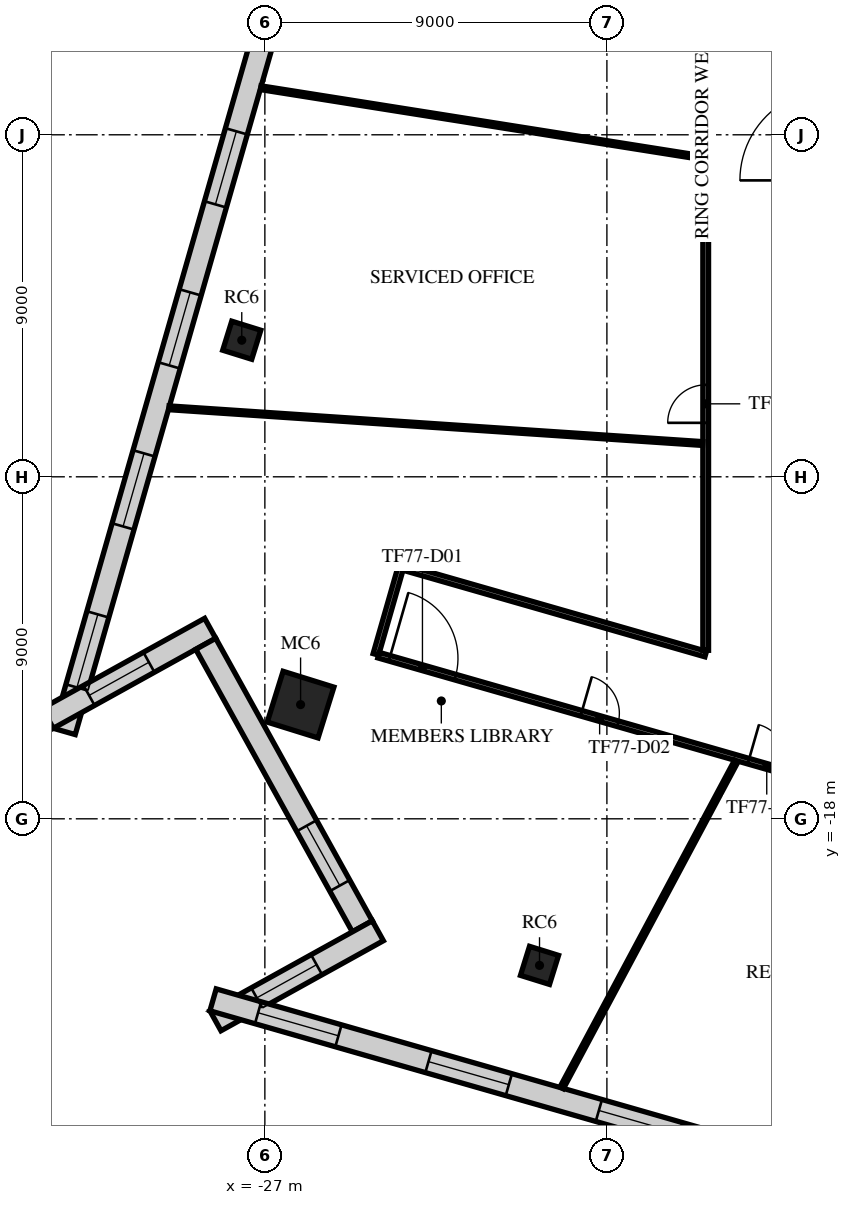
"""IFC4 building model, lengths in metres.
Left out: names, types, materials, properties, quantities, classifications, styles, units other than length and angle.
Written with IfcOpenShell. Run it as: python <this file> out.ifc"""

import sys

from ifc_helpers import new_model, si_unit, direction, frame, frame_2d, origin, origin_2d, place, context, subcontext, project, spatial, rectangle, extrude, element, fill, save


model = new_model("IFC4")
c1 = context("Model", 3, precision=1e-05, world=origin(), true_north=direction((0.0, 1.0)))
c2 = subcontext(c1, "Body", "Model", "MODEL_VIEW")
j1 = project(units=[si_unit("LENGTHUNIT", "METRE"), si_unit("PLANEANGLEUNIT", "RADIAN")], contexts=[c1])
p1 = place(None, origin())
s1 = spatial("IfcSite", under=j1, at=p1, CompositionType="ELEMENT")
p2 = place(p1, origin())
s2 = spatial("IfcBuilding", under=s1, at=p2, CompositionType="ELEMENT")
p3 = place(p2, frame((0.0, 0.0, 324.5)))
s3 = spatial("IfcBuildingStorey", under=s2, at=p3, CompositionType="ELEMENT", Elevation=324.5)
p4 = place(p3, frame((-27.608, -5.406, 0.0), z_axis=(0.0, 0.0, 1.0), x_axis=(0.297503182032, 0.954720826567, 0.0)))
e1 = element("IfcColumn", 1, at=p4, inside=s3, PredefinedType="COLUMN", context=c2, shape_type="SweptSolid", body=[
    extrude(rectangle(XDim=0.8, YDim=0.8, at=origin_2d()), origin(), (0.0, 0.0, 1.0), 4.0),
])
p5 = place(p3, frame((-26.06, -14.995, 0.0), z_axis=(0.0, 0.0, 1.0), x_axis=(0.297503182032, 0.954720826567, 0.0)))
e2 = element("IfcColumn", 2, at=p5, inside=s3, PredefinedType="COLUMN", context=c2, shape_type="SweptSolid", body=[
    extrude(rectangle(XDim=1.4, YDim=1.4, at=origin_2d()), origin(), (0.0, 0.0, 1.0), 4.0),
])
p6 = place(p3, frame((-19.773, -21.857, 0.0), z_axis=(0.0, 0.0, 1.0), x_axis=(0.297503182032, 0.954720826567, 0.0)))
e3 = element("IfcColumn", 3, at=p6, inside=s3, PredefinedType="COLUMN", context=c2, shape_type="SweptSolid", body=[
    extrude(rectangle(XDim=0.8, YDim=0.8, at=origin_2d()), origin(), (0.0, 0.0, 1.0), 4.0),
])
p7 = place(p3, frame((-18.913, 30.91, 0.0), z_axis=(0.0, 0.0, 1.0), x_axis=(-0.275636693765, -0.961261885778, 0.0)))
e4 = element("IfcWall", 4, at=p7, inside=s3, PredefinedType="STANDARD", context=c2, shape_type="SweptSolid", body=[
    extrude(rectangle(XDim=48.49, YDim=0.6, at=frame_2d((24.245, 0.0))), origin(), (0.0, 0.0, 1.0), 3.65),
])
p8 = place(p7, frame((1.204, 0.0, 0.9)))
e5 = element("IfcOpeningElement", 5, at=p8, cuts=e4, PredefinedType="OPENING", context=c2, shape_type="SweptSolid", body=[
    extrude(rectangle(XDim=2.0, YDim=2.1, at=frame_2d((1.0, 1.05))), frame((0.0, 0.31, 0.0), z_axis=(0.0, -1.0, 0.0), x_axis=(1.0, 0.0, 0.0)), (0.0, 0.0, 1.0), 0.62),
])
p9 = place(p7, frame((5.612, 0.0, 0.9)))
e6 = element("IfcOpeningElement", 6, at=p9, cuts=e4, PredefinedType="OPENING", context=c2, shape_type="SweptSolid", body=[
    extrude(rectangle(XDim=2.0, YDim=2.1, at=frame_2d((1.0, 1.05))), frame((0.0, 0.31, 0.0), z_axis=(0.0, -1.0, 0.0), x_axis=(1.0, 0.0, 0.0)), (0.0, 0.0, 1.0), 0.62),
])
p10 = place(p7, frame((10.021, 0.0, 0.9)))
e7 = element("IfcOpeningElement", 7, at=p10, cuts=e4, PredefinedType="OPENING", context=c2, shape_type="SweptSolid", body=[
    extrude(rectangle(XDim=2.0, YDim=2.1, at=frame_2d((1.0, 1.05))), frame((0.0, 0.31, 0.0), z_axis=(0.0, -1.0, 0.0), x_axis=(1.0, 0.0, 0.0)), (0.0, 0.0, 1.0), 0.62),
])
p11 = place(p7, frame((14.428, 0.0, 0.9)))
e8 = element("IfcOpeningElement", 8, at=p11, cuts=e4, PredefinedType="OPENING", context=c2, shape_type="SweptSolid", body=[
    extrude(rectangle(XDim=2.0, YDim=2.1, at=frame_2d((1.0, 1.05))), frame((0.0, 0.31, 0.0), z_axis=(0.0, -1.0, 0.0), x_axis=(1.0, 0.0, 0.0)), (0.0, 0.0, 1.0), 0.62),
])
p12 = place(p7, frame((18.837, 0.0, 0.9)))
e9 = element("IfcOpeningElement", 9, at=p12, cuts=e4, PredefinedType="OPENING", context=c2, shape_type="SweptSolid", body=[
    extrude(rectangle(XDim=2.0, YDim=2.1, at=frame_2d((1.0, 1.05))), frame((0.0, 0.31, 0.0), z_axis=(0.0, -1.0, 0.0), x_axis=(1.0, 0.0, 0.0)), (0.0, 0.0, 1.0), 0.62),
])
p13 = place(p7, frame((23.245, 0.0, 0.9)))
e10 = element("IfcOpeningElement", 10, at=p13, cuts=e4, PredefinedType="OPENING", context=c2, shape_type="SweptSolid", body=[
    extrude(rectangle(XDim=2.0, YDim=2.1, at=frame_2d((1.0, 1.05))), frame((0.0, 0.31, 0.0), z_axis=(0.0, -1.0, 0.0), x_axis=(1.0, 0.0, 0.0)), (0.0, 0.0, 1.0), 0.62),
])
p14 = place(p7, frame((27.653, 0.0, 0.9)))
e11 = element("IfcOpeningElement", 11, at=p14, cuts=e4, PredefinedType="OPENING", context=c2, shape_type="SweptSolid", body=[
    extrude(rectangle(XDim=2.0, YDim=2.1, at=frame_2d((1.0, 1.05))), frame((0.0, 0.31, 0.0), z_axis=(0.0, -1.0, 0.0), x_axis=(1.0, 0.0, 0.0)), (0.0, 0.0, 1.0), 0.62),
])
p15 = place(p7, frame((32.061, 0.0, 0.9)))
e12 = element("IfcOpeningElement", 12, at=p15, cuts=e4, PredefinedType="OPENING", context=c2, shape_type="SweptSolid", body=[
    extrude(rectangle(XDim=2.0, YDim=2.1, at=frame_2d((1.0, 1.05))), frame((0.0, 0.31, 0.0), z_axis=(0.0, -1.0, 0.0), x_axis=(1.0, 0.0, 0.0)), (0.0, 0.0, 1.0), 0.62),
])
p16 = place(p7, frame((36.469, 0.0, 0.9)))
e13 = element("IfcOpeningElement", 13, at=p16, cuts=e4, PredefinedType="OPENING", context=c2, shape_type="SweptSolid", body=[
    extrude(rectangle(XDim=2.0, YDim=2.1, at=frame_2d((1.0, 1.05))), frame((0.0, 0.31, 0.0), z_axis=(0.0, -1.0, 0.0), x_axis=(1.0, 0.0, 0.0)), (0.0, 0.0, 1.0), 0.62),
])
p17 = place(p7, frame((40.877, 0.0, 0.9)))
e14 = element("IfcOpeningElement", 14, at=p17, cuts=e4, PredefinedType="OPENING", context=c2, shape_type="SweptSolid", body=[
    extrude(rectangle(XDim=2.0, YDim=2.1, at=frame_2d((1.0, 1.05))), frame((0.0, 0.31, 0.0), z_axis=(0.0, -1.0, 0.0), x_axis=(1.0, 0.0, 0.0)), (0.0, 0.0, 1.0), 0.62),
])
p18 = place(p7, frame((45.285, 0.0, 0.9)))
e15 = element("IfcOpeningElement", 15, at=p18, cuts=e4, PredefinedType="OPENING", context=c2, shape_type="SweptSolid", body=[
    extrude(rectangle(XDim=2.0, YDim=2.1, at=frame_2d((1.0, 1.05))), frame((0.0, 0.31, 0.0), z_axis=(0.0, -1.0, 0.0), x_axis=(1.0, 0.0, 0.0)), (0.0, 0.0, 1.0), 0.62),
])
p19 = place(p3, frame((-32.712, -15.356, 0.0), z_axis=(0.0, 0.0, 1.0), x_axis=(0.874609472896, 0.48482808285, 0.0)))
e16 = element("IfcWall", 16, at=p19, inside=s3, PredefinedType="STANDARD", context=c2, shape_type="SweptSolid", body=[
    extrude(rectangle(XDim=4.885, YDim=0.6, at=frame_2d((2.443, 0.0))), origin(), (0.0, 0.0, 1.0), 3.65),
])
p20 = place(p19, frame((1.243, 0.0, 0.9)))
e17 = element("IfcOpeningElement", 17, at=p20, cuts=e16, PredefinedType="OPENING", context=c2, shape_type="SweptSolid", body=[
    extrude(rectangle(XDim=1.8, YDim=2.1, at=frame_2d((0.9, 1.05))), frame((0.0, 0.31, 0.0), z_axis=(0.0, -1.0, 0.0), x_axis=(1.0, 0.0, 0.0)), (0.0, 0.0, 1.0), 0.62),
])
p21 = place(p3, frame((-28.556, -13.395, 0.0), z_axis=(0.0, 0.0, 1.0), x_axis=(0.48481597855, -0.874616182644, 0.0)))
e18 = element("IfcWall", 18, at=p21, inside=s3, PredefinedType="STANDARD", context=c2, shape_type="SweptSolid", body=[
    extrude(rectangle(XDim=8.5, YDim=0.6, at=frame_2d((4.25, 0.0))), origin(), (0.0, 0.0, 1.0), 3.65),
])
p22 = place(p21, frame((5.475, 0.0, 0.9)))
e19 = element("IfcOpeningElement", 19, at=p22, cuts=e18, PredefinedType="OPENING", context=c2, shape_type="SweptSolid", body=[
    extrude(rectangle(XDim=1.8, YDim=2.1, at=frame_2d((0.9, 1.05))), frame((0.0, 0.31, 0.0), z_axis=(0.0, -1.0, 0.0), x_axis=(1.0, 0.0, 0.0)), (0.0, 0.0, 1.0), 0.62),
])
p23 = place(p3, frame((-24.027, -20.946, 0.0), z_axis=(0.0, 0.0, 1.0), x_axis=(-0.874642406439, -0.484768667364, 0.0)))
e20 = element("IfcWall", 20, at=p23, inside=s3, PredefinedType="STANDARD", context=c2, shape_type="SweptSolid", body=[
    extrude(rectangle(XDim=4.886, YDim=0.6, at=frame_2d((2.443, 0.0))), origin(), (0.0, 0.0, 1.0), 3.65),
])
p24 = place(p23, frame((1.843, 0.0, 0.9)))
e21 = element("IfcOpeningElement", 21, at=p24, cuts=e20, PredefinedType="OPENING", context=c2, shape_type="SweptSolid", body=[
    extrude(rectangle(XDim=1.8, YDim=2.1, at=frame_2d((0.9, 1.05))), frame((0.0, 0.31, 0.0), z_axis=(0.0, -1.0, 0.0), x_axis=(1.0, 0.0, 0.0)), (0.0, 0.0, 1.0), 0.62),
])
p25 = place(p3, frame((-28.363, -22.764, 0.0), z_axis=(0.0, 0.0, 1.0), x_axis=(0.961261250735, -0.275638908422, 0.0)))
e22 = element("IfcWall", 22, at=p25, inside=s3, PredefinedType="STANDARD", context=c2, shape_type="SweptSolid", body=[
    extrude(rectangle(XDim=41.979, YDim=0.6, at=frame_2d((20.99, 0.0))), origin(), (0.0, 0.0, 1.0), 3.65),
])
p26 = place(p25, frame((1.232, 0.0, 0.9)))
e23 = element("IfcOpeningElement", 23, at=p26, cuts=e22, PredefinedType="OPENING", context=c2, shape_type="SweptSolid", body=[
    extrude(rectangle(XDim=2.2, YDim=2.1, at=frame_2d((1.1, 1.05))), frame((0.0, 0.31, 0.0), z_axis=(0.0, -1.0, 0.0), x_axis=(1.0, 0.0, 0.0)), (0.0, 0.0, 1.0), 0.62),
])
p27 = place(p25, frame((5.896, 0.0, 0.9)))
e24 = element("IfcOpeningElement", 24, at=p27, cuts=e22, PredefinedType="OPENING", context=c2, shape_type="SweptSolid", body=[
    extrude(rectangle(XDim=2.2, YDim=2.1, at=frame_2d((1.1, 1.05))), frame((0.0, 0.31, 0.0), z_axis=(0.0, -1.0, 0.0), x_axis=(1.0, 0.0, 0.0)), (0.0, 0.0, 1.0), 0.62),
])
p28 = place(p25, frame((10.561, 0.0, 0.9)))
e25 = element("IfcOpeningElement", 25, at=p28, cuts=e22, PredefinedType="OPENING", context=c2, shape_type="SweptSolid", body=[
    extrude(rectangle(XDim=2.2, YDim=2.1, at=frame_2d((1.1, 1.05))), frame((0.0, 0.31, 0.0), z_axis=(0.0, -1.0, 0.0), x_axis=(1.0, 0.0, 0.0)), (0.0, 0.0, 1.0), 0.62),
])
p29 = place(p25, frame((15.225, 0.0, 0.9)))
e26 = element("IfcOpeningElement", 26, at=p29, cuts=e22, PredefinedType="OPENING", context=c2, shape_type="SweptSolid", body=[
    extrude(rectangle(XDim=2.2, YDim=2.1, at=frame_2d((1.1, 1.05))), frame((0.0, 0.31, 0.0), z_axis=(0.0, -1.0, 0.0), x_axis=(1.0, 0.0, 0.0)), (0.0, 0.0, 1.0), 0.62),
])
p30 = place(p25, frame((19.89, 0.0, 0.9)))
e27 = element("IfcOpeningElement", 27, at=p30, cuts=e22, PredefinedType="OPENING", context=c2, shape_type="SweptSolid", body=[
    extrude(rectangle(XDim=2.2, YDim=2.1, at=frame_2d((1.1, 1.05))), frame((0.0, 0.31, 0.0), z_axis=(0.0, -1.0, 0.0), x_axis=(1.0, 0.0, 0.0)), (0.0, 0.0, 1.0), 0.62),
])
p31 = place(p25, frame((24.554, 0.0, 0.9)))
e28 = element("IfcOpeningElement", 28, at=p31, cuts=e22, PredefinedType="OPENING", context=c2, shape_type="SweptSolid", body=[
    extrude(rectangle(XDim=2.2, YDim=2.1, at=frame_2d((1.1, 1.05))), frame((0.0, 0.31, 0.0), z_axis=(0.0, -1.0, 0.0), x_axis=(1.0, 0.0, 0.0)), (0.0, 0.0, 1.0), 0.62),
])
p32 = place(p25, frame((29.218, 0.0, 0.9)))
e29 = element("IfcOpeningElement", 29, at=p32, cuts=e22, PredefinedType="OPENING", context=c2, shape_type="SweptSolid", body=[
    extrude(rectangle(XDim=2.2, YDim=2.1, at=frame_2d((1.1, 1.05))), frame((0.0, 0.31, 0.0), z_axis=(0.0, -1.0, 0.0), x_axis=(1.0, 0.0, 0.0)), (0.0, 0.0, 1.0), 0.62),
])
p33 = place(p25, frame((33.883, 0.0, 0.9)))
e30 = element("IfcOpeningElement", 30, at=p33, cuts=e22, PredefinedType="OPENING", context=c2, shape_type="SweptSolid", body=[
    extrude(rectangle(XDim=2.2, YDim=2.1, at=frame_2d((1.1, 1.05))), frame((0.0, 0.31, 0.0), z_axis=(0.0, -1.0, 0.0), x_axis=(1.0, 0.0, 0.0)), (0.0, 0.0, 1.0), 0.62),
])
p34 = place(p25, frame((38.547, 0.0, 0.9)))
e31 = element("IfcOpeningElement", 31, at=p34, cuts=e22, PredefinedType="OPENING", context=c2, shape_type="SweptSolid", body=[
    extrude(rectangle(XDim=2.2, YDim=2.1, at=frame_2d((1.1, 1.05))), frame((0.0, 0.31, 0.0), z_axis=(0.0, -1.0, 0.0), x_axis=(1.0, 0.0, 0.0)), (0.0, 0.0, 1.0), 0.62),
])
p35 = place(p3, frame((-24.079, -13.673, 0.0), z_axis=(0.0, 0.0, 1.0), x_axis=(0.275849392554, 0.961200870072, 0.0)))
e32 = element("IfcWall", 32, at=p35, inside=s3, PredefinedType="PARTITIONING", context=c2, shape_type="SweptSolid", body=[
    extrude(rectangle(XDim=2.4, YDim=0.15, at=frame_2d((1.2, 0.0))), origin(), (0.0, 0.0, 1.0), 3.65),
])
p36 = place(p3, frame((-24.007, -13.694, 0.0), z_axis=(0.0, 0.0, 1.0), x_axis=(0.961264140923, -0.275628828998, 0.0)))
e33 = element("IfcWall", 33, at=p36, inside=s3, PredefinedType="PARTITIONING", context=c2, shape_type="SweptSolid", body=[
    extrude(rectangle(XDim=38.68, YDim=0.15, at=frame_2d((19.34, 0.0))), origin(), (0.0, 0.0, 1.0), 3.25),
])
p37 = place(p36, frame((0.3, 0.0, 0.0)))
e34 = element("IfcOpeningElement", 34, at=p37, cuts=e33, PredefinedType="OPENING", context=c2, shape_type="SweptSolid", body=[
    extrude(rectangle(XDim=1.8, YDim=2.1, at=frame_2d((0.9, 1.05))), frame((0.0, 0.085, 0.0), z_axis=(0.0, -1.0, 0.0), x_axis=(1.0, 0.0, 0.0)), (0.0, 0.0, 1.0), 0.17),
])
p38 = place(p36, frame((5.55, 0.0, 0.0)))
e35 = element("IfcOpeningElement", 35, at=p38, cuts=e33, PredefinedType="OPENING", context=c2, shape_type="SweptSolid", body=[
    extrude(rectangle(XDim=1.0, YDim=2.1, at=frame_2d((0.5, 1.05))), frame((0.0, 0.085, 0.0), z_axis=(0.0, -1.0, 0.0), x_axis=(1.0, 0.0, 0.0)), (0.0, 0.0, 1.0), 0.17),
])
p39 = place(p36, frame((10.125, 0.0, 0.0)))
e36 = element("IfcOpeningElement", 36, at=p39, cuts=e33, PredefinedType="OPENING", context=c2, shape_type="SweptSolid", body=[
    extrude(rectangle(XDim=1.0, YDim=2.1, at=frame_2d((0.5, 1.05))), frame((0.0, 0.085, 0.0), z_axis=(0.0, -1.0, 0.0), x_axis=(1.0, 0.0, 0.0)), (0.0, 0.0, 1.0), 0.17),
])
p40 = place(p36, frame((23.776, 0.0, 0.0)))
e37 = element("IfcOpeningElement", 37, at=p40, cuts=e33, PredefinedType="OPENING", context=c2, shape_type="SweptSolid", body=[
    extrude(rectangle(XDim=1.0, YDim=2.1, at=frame_2d((0.5, 1.05))), frame((0.0, 0.085, 0.0), z_axis=(0.0, -1.0, 0.0), x_axis=(1.0, 0.0, 0.0)), (0.0, 0.0, 1.0), 0.17),
])
p41 = place(p36, frame((31.675, 0.0, 0.0)))
e38 = element("IfcOpeningElement", 38, at=p41, cuts=e33, PredefinedType="OPENING", context=c2, shape_type="SweptSolid", body=[
    extrude(rectangle(XDim=1.8, YDim=2.1, at=frame_2d((0.9, 1.05))), frame((0.0, 0.085, 0.0), z_axis=(0.0, -1.0, 0.0), x_axis=(1.0, 0.0, 0.0)), (0.0, 0.0, 1.0), 0.17),
])
p42 = place(p3, frame((-23.345, -11.387, 0.0), z_axis=(0.0, 0.0, 1.0), x_axis=(0.961258213807, -0.275649499163, 0.0)))
e39 = element("IfcWall", 39, at=p42, inside=s3, PredefinedType="PARTITIONING", context=c2, shape_type="SweptSolid", body=[
    extrude(rectangle(XDim=8.265, YDim=0.15, at=frame_2d((4.133, 0.0))), origin(), (0.0, 0.0, 1.0), 3.25),
])
p43 = place(p3, frame((-15.4, -13.565, 0.0), z_axis=(0.0, 0.0, 1.0), x_axis=(0.0, 1.0, 0.0)))
e40 = element("IfcWall", 40, at=p43, inside=s3, PredefinedType="PARTITIONING", context=c2, shape_type="SweptSolid", body=[
    extrude(rectangle(XDim=28.965, YDim=0.15, at=frame_2d((14.483, 0.0))), origin(), (0.0, 0.0, 1.0), 3.25),
])
p44 = place(p43, frame((5.986, 0.0, 0.0)))
e41 = element("IfcOpeningElement", 41, at=p44, cuts=e40, PredefinedType="OPENING", context=c2, shape_type="SweptSolid", body=[
    extrude(rectangle(XDim=1.0, YDim=2.1, at=frame_2d((0.5, 1.05))), frame((0.0, 0.085, 0.0), z_axis=(0.0, -1.0, 0.0), x_axis=(1.0, 0.0, 0.0)), (0.0, 0.0, 1.0), 0.17),
])
p45 = place(p43, frame((17.249, 0.0, 0.0)))
e42 = element("IfcOpeningElement", 42, at=p45, cuts=e40, PredefinedType="OPENING", context=c2, shape_type="SweptSolid", body=[
    extrude(rectangle(XDim=1.0, YDim=2.1, at=frame_2d((0.5, 1.05))), frame((0.0, 0.085, 0.0), z_axis=(0.0, -1.0, 0.0), x_axis=(1.0, 0.0, 0.0)), (0.0, 0.0, 1.0), 0.17),
])
p46 = place(p43, frame((25.571, 0.0, 0.0)))
e43 = element("IfcOpeningElement", 43, at=p46, cuts=e40, PredefinedType="OPENING", context=c2, shape_type="SweptSolid", body=[
    extrude(rectangle(XDim=1.0, YDim=2.1, at=frame_2d((0.5, 1.05))), frame((0.0, 0.085, 0.0), z_axis=(0.0, -1.0, 0.0), x_axis=(1.0, 0.0, 0.0)), (0.0, 0.0, 1.0), 0.17),
])
p47 = place(p3, frame((-29.522, -7.184, 0.0), z_axis=(0.0, 0.0, 1.0), x_axis=(0.997764155263, -0.06683330361, 0.0)))
e44 = element("IfcWall", 44, at=p47, inside=s3, PredefinedType="PARTITIONING", context=c2, shape_type="SweptSolid", body=[
    extrude(rectangle(XDim=14.075, YDim=0.1, at=frame_2d((7.038, 0.0))), origin(), (0.0, 0.0, 1.0), 3.05),
])
p48 = place(p3, frame((-27.107, 1.238, 0.0), z_axis=(0.0, 0.0, 1.0), x_axis=(0.987675008346, -0.156518618344, 0.0)))
e45 = element("IfcWall", 45, at=p48, inside=s3, PredefinedType="PARTITIONING", context=c2, shape_type="SweptSolid", body=[
    extrude(rectangle(XDim=11.769, YDim=0.1, at=frame_2d((5.884, 0.0))), origin(), (0.0, 0.0, 1.0), 3.05),
])
p49 = place(p3, frame((-19.19, -25.08, 0.0), z_axis=(0.0, 0.0, 1.0), x_axis=(0.471201621995, 0.882025527652, 0.0)))
e46 = element("IfcWall", 46, at=p49, inside=s3, PredefinedType="PARTITIONING", context=c2, shape_type="SweptSolid", body=[
    extrude(rectangle(XDim=9.749, YDim=0.1, at=frame_2d((4.875, 0.0))), origin(), (0.0, 0.0, 1.0), 3.05),
])
p50 = place(p15, origin())
e47 = element("IfcWindow", 47, at=p50, inside=s3, PartitioningType="SINGLE_PANEL", PredefinedType="WINDOW", context=c2, shape_type="SweptSolid", body=[
    extrude(rectangle(XDim=2.0, YDim=2.1, at=frame_2d((1.0, 1.05))), frame((0.0, 0.03, 0.0), z_axis=(0.0, -1.0, 0.0), x_axis=(1.0, 0.0, 0.0)), (0.0, 0.0, 1.0), 0.06),
])
fill(e12, e47)
p51 = place(p16, origin())
e48 = element("IfcWindow", 48, at=p51, inside=s3, PartitioningType="SINGLE_PANEL", PredefinedType="WINDOW", context=c2, shape_type="SweptSolid", body=[
    extrude(rectangle(XDim=2.0, YDim=2.1, at=frame_2d((1.0, 1.05))), frame((0.0, 0.03, 0.0), z_axis=(0.0, -1.0, 0.0), x_axis=(1.0, 0.0, 0.0)), (0.0, 0.0, 1.0), 0.06),
])
fill(e13, e48)
p52 = place(p17, origin())
e49 = element("IfcWindow", 49, at=p52, inside=s3, PartitioningType="SINGLE_PANEL", PredefinedType="WINDOW", context=c2, shape_type="SweptSolid", body=[
    extrude(rectangle(XDim=2.0, YDim=2.1, at=frame_2d((1.0, 1.05))), frame((0.0, 0.03, 0.0), z_axis=(0.0, -1.0, 0.0), x_axis=(1.0, 0.0, 0.0)), (0.0, 0.0, 1.0), 0.06),
])
fill(e14, e49)
p53 = place(p18, origin())
e50 = element("IfcWindow", 50, at=p53, inside=s3, PartitioningType="SINGLE_PANEL", PredefinedType="WINDOW", context=c2, shape_type="SweptSolid", body=[
    extrude(rectangle(XDim=2.0, YDim=2.1, at=frame_2d((1.0, 1.05))), frame((0.0, 0.03, 0.0), z_axis=(0.0, -1.0, 0.0), x_axis=(1.0, 0.0, 0.0)), (0.0, 0.0, 1.0), 0.06),
])
fill(e15, e50)
p54 = place(p20, origin())
e51 = element("IfcWindow", 51, at=p54, inside=s3, PartitioningType="SINGLE_PANEL", PredefinedType="WINDOW", context=c2, shape_type="SweptSolid", body=[
    extrude(rectangle(XDim=1.8, YDim=2.1, at=frame_2d((0.9, 1.05))), frame((0.0, 0.03, 0.0), z_axis=(0.0, -1.0, 0.0), x_axis=(1.0, 0.0, 0.0)), (0.0, 0.0, 1.0), 0.06),
])
fill(e17, e51)
p55 = place(p22, origin())
e52 = element("IfcWindow", 52, at=p55, inside=s3, PartitioningType="SINGLE_PANEL", PredefinedType="WINDOW", context=c2, shape_type="SweptSolid", body=[
    extrude(rectangle(XDim=1.8, YDim=2.1, at=frame_2d((0.9, 1.05))), frame((0.0, 0.03, 0.0), z_axis=(0.0, -1.0, 0.0), x_axis=(1.0, 0.0, 0.0)), (0.0, 0.0, 1.0), 0.06),
])
fill(e19, e52)
p56 = place(p24, origin())
e53 = element("IfcWindow", 53, at=p56, inside=s3, PartitioningType="SINGLE_PANEL", PredefinedType="WINDOW", context=c2, shape_type="SweptSolid", body=[
    extrude(rectangle(XDim=1.8, YDim=2.1, at=frame_2d((0.9, 1.05))), frame((0.0, 0.03, 0.0), z_axis=(0.0, -1.0, 0.0), x_axis=(1.0, 0.0, 0.0)), (0.0, 0.0, 1.0), 0.06),
])
fill(e21, e53)
p57 = place(p26, origin())
e54 = element("IfcWindow", 54, at=p57, inside=s3, PartitioningType="SINGLE_PANEL", PredefinedType="WINDOW", context=c2, shape_type="SweptSolid", body=[
    extrude(rectangle(XDim=2.2, YDim=2.1, at=frame_2d((1.1, 1.05))), frame((0.0, 0.03, 0.0), z_axis=(0.0, -1.0, 0.0), x_axis=(1.0, 0.0, 0.0)), (0.0, 0.0, 1.0), 0.06),
])
fill(e23, e54)
p58 = place(p27, origin())
e55 = element("IfcWindow", 55, at=p58, inside=s3, PartitioningType="SINGLE_PANEL", PredefinedType="WINDOW", context=c2, shape_type="SweptSolid", body=[
    extrude(rectangle(XDim=2.2, YDim=2.1, at=frame_2d((1.1, 1.05))), frame((0.0, 0.03, 0.0), z_axis=(0.0, -1.0, 0.0), x_axis=(1.0, 0.0, 0.0)), (0.0, 0.0, 1.0), 0.06),
])
fill(e24, e55)
p59 = place(p28, origin())
e56 = element("IfcWindow", 56, at=p59, inside=s3, PartitioningType="SINGLE_PANEL", PredefinedType="WINDOW", context=c2, shape_type="SweptSolid", body=[
    extrude(rectangle(XDim=2.2, YDim=2.1, at=frame_2d((1.1, 1.05))), frame((0.0, 0.03, 0.0), z_axis=(0.0, -1.0, 0.0), x_axis=(1.0, 0.0, 0.0)), (0.0, 0.0, 1.0), 0.06),
])
fill(e25, e56)
p60 = place(p37, frame((1.8, 0.0, 0.0), z_axis=(0.0, 0.0, 1.0), x_axis=(-1.0, 0.0, 0.0)))
e57 = element("IfcDoor", 57, at=p60, inside=s3, OperationType="DOUBLE_DOOR_SINGLE_SWING", PredefinedType="DOOR", context=c2, shape_type="SweptSolid", body=[
    extrude(rectangle(XDim=1.8, YDim=2.1, at=frame_2d((0.9, 1.05))), frame((0.0, 0.025, 0.0), z_axis=(0.0, -1.0, 0.0), x_axis=(1.0, 0.0, 0.0)), (0.0, 0.0, 1.0), 0.05),
])
fill(e34, e57)
p61 = place(p38, frame((1.0, 0.0, 0.0), z_axis=(0.0, 0.0, 1.0), x_axis=(-1.0, 0.0, 0.0)))
e58 = element("IfcDoor", 58, at=p61, inside=s3, OperationType="SINGLE_SWING_RIGHT", PredefinedType="DOOR", context=c2, shape_type="SweptSolid", body=[
    extrude(rectangle(XDim=1.0, YDim=2.1, at=frame_2d((0.5, 1.05))), frame((0.0, 0.025, 0.0), z_axis=(0.0, -1.0, 0.0), x_axis=(1.0, 0.0, 0.0)), (0.0, 0.0, 1.0), 0.05),
])
fill(e35, e58)
p62 = place(p44, origin())
e59 = element("IfcDoor", 59, at=p62, inside=s3, OperationType="SINGLE_SWING_RIGHT", PredefinedType="DOOR", context=c2, shape_type="SweptSolid", body=[
    extrude(rectangle(XDim=1.0, YDim=2.1, at=frame_2d((0.5, 1.05))), frame((0.0, 0.025, 0.0), z_axis=(0.0, -1.0, 0.0), x_axis=(1.0, 0.0, 0.0)), (0.0, 0.0, 1.0), 0.05),
])
fill(e41, e59)
p63 = place(p39, frame((1.0, 0.0, 0.0), z_axis=(0.0, 0.0, 1.0), x_axis=(-1.0, 0.0, 0.0)))
e60 = element("IfcDoor", 60, at=p63, inside=s3, OperationType="SINGLE_SWING_LEFT", PredefinedType="DOOR", context=c2, shape_type="SweptSolid", body=[
    extrude(rectangle(XDim=1.0, YDim=2.1, at=frame_2d((0.5, 1.05))), frame((0.0, 0.025, 0.0), z_axis=(0.0, -1.0, 0.0), x_axis=(1.0, 0.0, 0.0)), (0.0, 0.0, 1.0), 0.05),
])
fill(e36, e60)
save(model, sys.argv[1])
